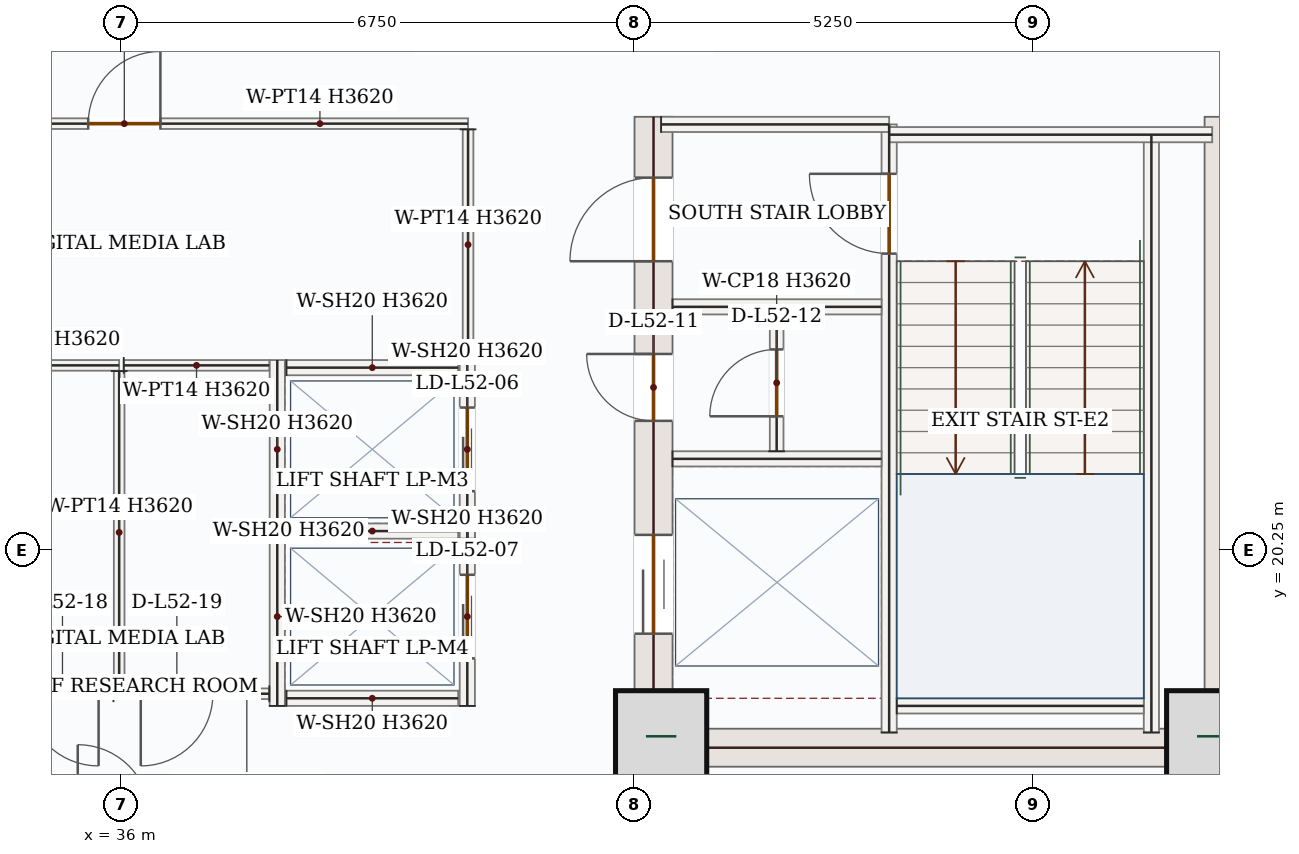
"""IFC4 building model, lengths in metres.
Left out: names, types, materials, properties, quantities, classifications, styles, units other than length and angle.
Written with IfcOpenShell. Run it as: python <this file> out.ifc"""

import sys

from ifc_helpers import new_model, si_unit, direction, frame, frame_2d, origin, origin_2d, place, context, subcontext, project, spatial, rectangle, extrude, source, transform, mapped, element, fill, save


model = new_model("IFC4")
c1 = context("Model", 3, precision=1e-05, world=origin(), true_north=direction((0.0, 1.0)))
c2 = subcontext(c1, "Body", "Model", "MODEL_VIEW")
j1 = project(units=[si_unit("LENGTHUNIT", "METRE"), si_unit("PLANEANGLEUNIT", "RADIAN")], contexts=[c1])
p1 = place(None, origin())
s1 = spatial("IfcSite", under=j1, at=p1, CompositionType="ELEMENT")
p2 = place(p1, origin())
s2 = spatial("IfcBuilding", under=s1, at=p2, CompositionType="ELEMENT")
p3 = place(p2, frame((0.0, 0.0, 221.4)))
s3 = spatial("IfcBuildingStorey", under=s2, at=p3, CompositionType="ELEMENT", Elevation=221.4)
p4 = place(p3, frame((43.0, 17.4, 0.0), z_axis=(0.0, 0.0, 1.0), x_axis=(0.0, 1.0, 0.0)))
e1 = element("IfcWall", 1, at=p4, inside=s3, PredefinedType="SHEAR", context=c2, shape_type="SweptSolid", body=[
    extrude(rectangle(XDim=8.55, YDim=0.5, at=frame_2d((4.275, 0.0))), origin(), (0.0, 0.0, 1.0), 3.62),
])
p5 = place(p4, frame((6.65, 0.0, 0.0)))
e2 = element("IfcOpeningElement", 2, at=p5, cuts=e1, PredefinedType="OPENING", context=c2, shape_type="SweptSolid", body=[
    extrude(rectangle(XDim=1.1, YDim=2.2, at=frame_2d((0.55, 1.1))), frame((0.0, 0.26, 0.0), z_axis=(0.0, -1.0, 0.0), x_axis=(1.0, 0.0, 0.0)), (0.0, 0.0, 1.0), 0.52),
])
p6 = place(p4, frame((1.75, 0.0, 0.0)))
e3 = element("IfcOpeningElement", 3, at=p6, cuts=e1, PredefinedType="OPENING", context=c2, shape_type="SweptSolid", body=[
    extrude(rectangle(XDim=1.3, YDim=2.2, at=frame_2d((0.65, 1.1))), frame((0.0, 0.26, 0.0), z_axis=(0.0, -1.0, 0.0), x_axis=(1.0, 0.0, 0.0)), (0.0, 0.0, 1.0), 0.52),
])
p7 = place(p4, frame((4.55, 0.0, 0.0)))
e4 = element("IfcOpeningElement", 4, at=p7, cuts=e1, PredefinedType="OPENING", context=c2, shape_type="SweptSolid", body=[
    extrude(rectangle(XDim=0.88, YDim=2.1, at=frame_2d((0.44, 1.05))), frame((0.0, 0.26, 0.0), z_axis=(0.0, -1.0, 0.0), x_axis=(1.0, 0.0, 0.0)), (0.0, 0.0, 1.0), 0.52),
])
m1 = source(origin(), c2, "Body", "SweptSolid", [
    extrude(rectangle(XDim=8.55, YDim=0.5, at=frame_2d((4.275, 0.0))), origin(), (0.0, 0.0, 1.0), 3.62),
])
p8 = place(p3, frame((50.5, 17.4, 0.0), z_axis=(0.0, 0.0, 1.0), x_axis=(0.0, 1.0, 0.0)))
e5 = element("IfcWall", 5, at=p8, inside=s3, PredefinedType="SHEAR", context=c2, shape_type="MappedRepresentation", body=[
    mapped(m1, transform((0.0, 0.0, 0.0), x_axis=(1.0, 0.0, 0.0), y_axis=(0.0, 1.0, 0.0), z_axis=(0.0, 0.0, 1.0), scale=1.0)),
])
m2 = source(origin(), c2, "Body", "SweptSolid", [
    extrude(rectangle(XDim=7.0, YDim=0.5, at=frame_2d((3.5, 0.0))), origin(), (0.0, 0.0, 1.0), 3.62),
])
p9 = place(p3, frame((43.25, 17.65, 0.0), z_axis=(0.0, 0.0, 1.0), x_axis=(1.0, 0.0, 0.0)))
e6 = element("IfcWall", 6, at=p9, inside=s3, PredefinedType="SHEAR", context=c2, shape_type="MappedRepresentation", body=[
    mapped(m2, transform((0.0, 0.0, 0.0), x_axis=(1.0, 0.0, 0.0), y_axis=(0.0, 1.0, 0.0), z_axis=(0.0, 0.0, 1.0), scale=1.0)),
])
m3 = source(origin(), c2, "Body", "SweptSolid", [
    extrude(rectangle(XDim=1.2, YDim=1.2, at=origin_2d()), origin(), (0.0, 0.0, 1.0), 3.9),
])
for number, where, z_axis, x_axis in (
    (7, (43.1, 17.8, 0.0), (0.0, 0.0, 1.0), (1.0, 0.0, 0.0)),
    (8, (50.35, 17.8, 0.0), (0.0, 0.0, 1.0), (1.0, 0.0, 0.0)),
):
    element("IfcColumn", number, at=place(p3, frame(where, z_axis=z_axis, x_axis=x_axis)), inside=s3, PredefinedType="COLUMN", context=c2, shape_type="MappedRepresentation", body=[
        mapped(m3, transform((0.0, 0.0, 0.0), x_axis=(1.0, 0.0, 0.0), y_axis=(0.0, 1.0, 0.0), z_axis=(0.0, 0.0, 1.0), scale=1.0)),
    ])
p10 = place(p3, frame((53.06, 18.458, 0.0), z_axis=(0.0, 0.0, 1.0), x_axis=(-0.707106781187, -0.707106781187, 0.0)))
e9 = element("IfcWall", 9, at=p10, inside=s3, PredefinedType="SOLIDWALL", context=c2, shape_type="SweptSolid", body=[
    extrude(rectangle(XDim=5.258, YDim=0.28, at=frame_2d((2.629, 0.0))), origin(), (0.0, 0.0, 1.0), 3.62),
])
p11 = place(p10, frame((1.729, 0.0, 0.85)))
e10 = element("IfcOpeningElement", 10, at=p11, cuts=e9, PredefinedType="OPENING", context=c2, shape_type="SweptSolid", body=[
    extrude(rectangle(XDim=1.8, YDim=1.75, at=frame_2d((0.9, 0.875))), frame((0.0, 0.15, 0.0), z_axis=(0.0, -1.0, 0.0), x_axis=(1.0, 0.0, 0.0)), (0.0, 0.0, 1.0), 0.3),
])
m4 = source(origin(), c2, "Body", "SweptSolid", [
    extrude(rectangle(XDim=7.87, YDim=0.2, at=frame_2d((3.935, 0.0))), origin(), (0.0, 0.0, 1.0), 3.62),
])
p12 = place(p3, frame((49.55, 17.85, 0.0), z_axis=(0.0, 0.0, 1.0), x_axis=(0.0, 1.0, 0.0)))
e11 = element("IfcWall", 11, at=p12, inside=s3, PredefinedType="SOLIDWALL", context=c2, shape_type="MappedRepresentation", body=[
    mapped(m4, transform((0.0, 0.0, 0.0), x_axis=(1.0, 0.0, 0.0), y_axis=(0.0, 1.0, 0.0), z_axis=(0.0, 0.0, 1.0), scale=1.0)),
])
p13 = place(p3, frame((46.1, 17.85, 0.0), z_axis=(0.0, 0.0, 1.0), x_axis=(0.0, 1.0, 0.0)))
e12 = element("IfcWall", 12, at=p13, inside=s3, PredefinedType="SOLIDWALL", context=c2, shape_type="SweptSolid", body=[
    extrude(rectangle(XDim=8.0, YDim=0.2, at=frame_2d((4.0, 0.0))), origin(), (0.0, 0.0, 1.0), 3.62),
])
p14 = place(p13, frame((6.3, 0.0, 0.0)))
e13 = element("IfcOpeningElement", 13, at=p14, cuts=e12, PredefinedType="OPENING", context=c2, shape_type="SweptSolid", body=[
    extrude(rectangle(XDim=1.05, YDim=2.15, at=frame_2d((0.525, 1.075))), frame((0.0, 0.11, 0.0), z_axis=(0.0, -1.0, 0.0), x_axis=(1.0, 0.0, 0.0)), (0.0, 0.0, 1.0), 0.22),
])
m5 = source(origin(), c2, "Body", "SweptSolid", [
    extrude(rectangle(XDim=3.0, YDim=0.2, at=frame_2d((1.5, 0.0))), origin(), (0.0, 0.0, 1.0), 3.62),
])
p15 = place(p3, frame((43.1, 25.85, 0.0), z_axis=(0.0, 0.0, 1.0), x_axis=(1.0, 0.0, 0.0)))
e14 = element("IfcWall", 14, at=p15, inside=s3, PredefinedType="SOLIDWALL", context=c2, shape_type="MappedRepresentation", body=[
    mapped(m5, transform((0.0, 0.0, 0.0), x_axis=(1.0, 0.0, 0.0), y_axis=(0.0, 1.0, 0.0), z_axis=(0.0, 0.0, 1.0), scale=1.0)),
])
m6 = source(origin(), c2, "Body", "SweptSolid", [
    extrude(rectangle(XDim=4.25, YDim=0.2, at=frame_2d((2.125, 0.0))), origin(), (0.0, 0.0, 1.0), 3.62),
])
p16 = place(p3, frame((46.1, 25.715, 0.0), z_axis=(0.0, 0.0, 1.0), x_axis=(1.0, 0.0, 0.0)))
e15 = element("IfcWall", 15, at=p16, inside=s3, PredefinedType="SOLIDWALL", context=c2, shape_type="MappedRepresentation", body=[
    mapped(m6, transform((0.0, 0.0, 0.0), x_axis=(1.0, 0.0, 0.0), y_axis=(0.0, 1.0, 0.0), z_axis=(0.0, 0.0, 1.0), scale=1.0)),
])
m7 = source(origin(), c2, "Body", "SweptSolid", [
    extrude(rectangle(XDim=3.25, YDim=0.2, at=frame_2d((1.625, 0.0))), origin(), (0.0, 0.0, 1.0), 3.62),
])
p17 = place(p3, frame((46.2, 18.2, 0.0), z_axis=(0.0, 0.0, 1.0), x_axis=(1.0, 0.0, 0.0)))
e16 = element("IfcWall", 16, at=p17, inside=s3, PredefinedType="SOLIDWALL", context=c2, shape_type="MappedRepresentation", body=[
    mapped(m7, transform((0.0, 0.0, 0.0), x_axis=(1.0, 0.0, 0.0), y_axis=(0.0, 1.0, 0.0), z_axis=(0.0, 0.0, 1.0), scale=1.0)),
])
m8 = source(origin(), c2, "Body", "SweptSolid", [
    extrude(rectangle(XDim=2.75, YDim=0.2, at=frame_2d((1.375, 0.0))), origin(), (0.0, 0.0, 1.0), 3.62),
])
for number, where, z_axis, x_axis in (
    (17, (43.25, 23.45, 0.0), (0.0, 0.0, 1.0), (1.0, 0.0, 0.0)),
    (18, (43.25, 21.45, 0.0), (0.0, 0.0, 1.0), (1.0, 0.0, 0.0)),
):
    element("IfcWall", number, at=place(p3, frame(where, z_axis=z_axis, x_axis=x_axis)), inside=s3, PredefinedType="SOLIDWALL", context=c2, shape_type="MappedRepresentation", body=[
        mapped(m8, transform((0.0, 0.0, 0.0), x_axis=(1.0, 0.0, 0.0), y_axis=(0.0, 1.0, 0.0), z_axis=(0.0, 0.0, 1.0), scale=1.0)),
    ])
p18 = place(p3, frame((44.62, 21.55, 0.0), z_axis=(0.0, 0.0, 1.0), x_axis=(0.0, 1.0, 0.0)))
e19 = element("IfcWall", 19, at=p18, inside=s3, PredefinedType="PARTITIONING", context=c2, shape_type="SweptSolid", body=[
    extrude(rectangle(XDim=1.8, YDim=0.18, at=frame_2d((0.9, 0.0))), origin(), (0.0, 0.0, 1.0), 3.62),
])
p19 = place(p18, frame((0.46, 0.0, 0.0)))
e20 = element("IfcOpeningElement", 20, at=p19, cuts=e19, PredefinedType="OPENING", context=c2, shape_type="SweptSolid", body=[
    extrude(rectangle(XDim=0.88, YDim=2.1, at=frame_2d((0.44, 1.05))), frame((0.0, 0.1, 0.0), z_axis=(0.0, -1.0, 0.0), x_axis=(1.0, 0.0, 0.0)), (0.0, 0.0, 1.0), 0.2),
])
m9 = source(origin(), c2, "Body", "SweptSolid", [
    extrude(rectangle(XDim=2.35, YDim=0.2, at=frame_2d((1.175, 0.0))), origin(), (0.0, 0.0, 1.0), 3.62),
])
p20 = place(p3, frame((38.05, 20.4, 0.0), z_axis=(0.0, 0.0, 1.0), x_axis=(0.0, 1.0, 0.0)))
e21 = element("IfcWall", 21, at=p20, inside=s3, PredefinedType="SOLIDWALL", context=c2, shape_type="MappedRepresentation", body=[
    mapped(m9, transform((0.0, 0.0, 0.0), x_axis=(1.0, 0.0, 0.0), y_axis=(0.0, 1.0, 0.0), z_axis=(0.0, 0.0, 1.0), scale=1.0)),
])
p21 = place(p3, frame((40.55, 20.4, 0.0), z_axis=(0.0, 0.0, 1.0), x_axis=(0.0, 1.0, 0.0)))
e22 = element("IfcWall", 22, at=p21, inside=s3, PredefinedType="SOLIDWALL", context=c2, shape_type="SweptSolid", body=[
    extrude(rectangle(XDim=2.35, YDim=0.2, at=frame_2d((1.175, 0.0))), origin(), (0.0, 0.0, 1.0), 3.62),
])
p22 = place(p21, frame((0.625, 0.0, 0.0)))
e23 = element("IfcOpeningElement", 23, at=p22, cuts=e22, PredefinedType="OPENING", context=c2, shape_type="SweptSolid", body=[
    extrude(rectangle(XDim=1.1, YDim=2.15, at=frame_2d((0.55, 1.075))), frame((0.0, 0.11, 0.0), z_axis=(0.0, -1.0, 0.0), x_axis=(1.0, 0.0, 0.0)), (0.0, 0.0, 1.0), 0.22),
])
m10 = source(origin(), c2, "Body", "SweptSolid", [
    extrude(rectangle(XDim=2.26, YDim=0.2, at=frame_2d((1.13, 0.0))), origin(), (0.0, 0.0, 1.0), 3.62),
])
for number, where, z_axis, x_axis in (
    (24, (38.17, 20.5, 0.0), (0.0, 0.0, 1.0), (1.0, 0.0, 0.0)),
    (25, (38.17, 22.65, 0.0), (0.0, 0.0, 1.0), (1.0, 0.0, 0.0)),
):
    element("IfcWall", number, at=place(p3, frame(where, z_axis=z_axis, x_axis=x_axis)), inside=s3, PredefinedType="SOLIDWALL", context=c2, shape_type="MappedRepresentation", body=[
        mapped(m10, transform((0.0, 0.0, 0.0), x_axis=(1.0, 0.0, 0.0), y_axis=(0.0, 1.0, 0.0), z_axis=(0.0, 0.0, 1.0), scale=1.0)),
    ])
p23 = place(p3, frame((38.05, 18.2, 0.0), z_axis=(0.0, 0.0, 1.0), x_axis=(0.0, 1.0, 0.0)))
e26 = element("IfcWall", 26, at=p23, inside=s3, PredefinedType="SOLIDWALL", context=c2, shape_type="MappedRepresentation", body=[
    mapped(m9, transform((0.0, 0.0, 0.0), x_axis=(1.0, 0.0, 0.0), y_axis=(0.0, 1.0, 0.0), z_axis=(0.0, 0.0, 1.0), scale=1.0)),
])
p24 = place(p3, frame((40.55, 18.2, 0.0), z_axis=(0.0, 0.0, 1.0), x_axis=(0.0, 1.0, 0.0)))
e27 = element("IfcWall", 27, at=p24, inside=s3, PredefinedType="SOLIDWALL", context=c2, shape_type="SweptSolid", body=[
    extrude(rectangle(XDim=2.35, YDim=0.2, at=frame_2d((1.175, 0.0))), origin(), (0.0, 0.0, 1.0), 3.62),
])
p25 = place(p24, frame((0.625, 0.0, 0.0)))
e28 = element("IfcOpeningElement", 28, at=p25, cuts=e27, PredefinedType="OPENING", context=c2, shape_type="SweptSolid", body=[
    extrude(rectangle(XDim=1.1, YDim=2.15, at=frame_2d((0.55, 1.075))), frame((0.0, 0.11, 0.0), z_axis=(0.0, -1.0, 0.0), x_axis=(1.0, 0.0, 0.0)), (0.0, 0.0, 1.0), 0.22),
])
p26 = place(p3, frame((38.17, 18.3, 0.0), z_axis=(0.0, 0.0, 1.0), x_axis=(1.0, 0.0, 0.0)))
e29 = element("IfcWall", 29, at=p26, inside=s3, PredefinedType="SOLIDWALL", context=c2, shape_type="MappedRepresentation", body=[
    mapped(m10, transform((0.0, 0.0, 0.0), x_axis=(1.0, 0.0, 0.0), y_axis=(0.0, 1.0, 0.0), z_axis=(0.0, 0.0, 1.0), scale=1.0)),
])
m11 = source(origin(), c2, "Body", "SweptSolid", [
    extrude(rectangle(XDim=1.915, YDim=0.14, at=frame_2d((0.958, 0.0))), origin(), (0.0, 0.0, 1.0), 3.62),
])
p27 = place(p3, frame((34.055, 22.68, 0.0), z_axis=(0.0, 0.0, 1.0), x_axis=(1.0, 0.0, 0.0)))
e30 = element("IfcWall", 30, at=p27, inside=s3, PredefinedType="PARTITIONING", context=c2, shape_type="MappedRepresentation", body=[
    mapped(m11, transform((0.0, 0.0, 0.0), x_axis=(1.0, 0.0, 0.0), y_axis=(0.0, 1.0, 0.0), z_axis=(0.0, 0.0, 1.0), scale=1.0)),
])
m12 = source(origin(), c2, "Body", "SweptSolid", [
    extrude(rectangle(XDim=4.245, YDim=0.14, at=frame_2d((2.123, 0.0))), origin(), (0.0, 0.0, 1.0), 3.62),
])
p28 = place(p3, frame((35.97, 22.605, 0.0), z_axis=(0.0, 0.0, 1.0), x_axis=(0.0, -1.0, 0.0)))
e31 = element("IfcWall", 31, at=p28, inside=s3, PredefinedType="PARTITIONING", context=c2, shape_type="MappedRepresentation", body=[
    mapped(m12, transform((0.0, 0.0, 0.0), x_axis=(1.0, 0.0, 0.0), y_axis=(0.0, 1.0, 0.0), z_axis=(0.0, 0.0, 1.0), scale=1.0)),
])
p29 = place(p3, frame((35.895, 18.36, 0.0), z_axis=(0.0, 0.0, 1.0), x_axis=(-1.0, 0.0, 0.0)))
e32 = element("IfcWall", 32, at=p29, inside=s3, PredefinedType="PARTITIONING", context=c2, shape_type="SweptSolid", body=[
    extrude(rectangle(XDim=1.84, YDim=0.14, at=frame_2d((0.92, 0.0))), origin(), (0.0, 0.0, 1.0), 3.62),
])
p30 = place(p29, frame((0.196, 0.0, 0.0)))
e33 = element("IfcOpeningElement", 33, at=p30, cuts=e32, PredefinedType="OPENING", context=c2, shape_type="SweptSolid", body=[
    extrude(rectangle(XDim=0.95, YDim=2.15, at=frame_2d((0.475, 1.075))), frame((0.0, 0.08, 0.0), z_axis=(0.0, -1.0, 0.0), x_axis=(1.0, 0.0, 0.0)), (0.0, 0.0, 1.0), 0.16),
])
p31 = place(p3, frame((36.03, 22.68, 0.0), z_axis=(0.0, 0.0, 1.0), x_axis=(1.0, 0.0, 0.0)))
e34 = element("IfcWall", 34, at=p31, inside=s3, PredefinedType="PARTITIONING", context=c2, shape_type="MappedRepresentation", body=[
    mapped(m11, transform((0.0, 0.0, 0.0), x_axis=(1.0, 0.0, 0.0), y_axis=(0.0, 1.0, 0.0), z_axis=(0.0, 0.0, 1.0), scale=1.0)),
])
p32 = place(p3, frame((37.945, 18.36, 0.0), z_axis=(0.0, 0.0, 1.0), x_axis=(-1.0, 0.0, 0.0)))
e35 = element("IfcWall", 35, at=p32, inside=s3, PredefinedType="PARTITIONING", context=c2, shape_type="SweptSolid", body=[
    extrude(rectangle(XDim=1.9, YDim=0.14, at=frame_2d((0.95, 0.0))), origin(), (0.0, 0.0, 1.0), 3.62),
])
p33 = place(p32, frame((0.741, 0.0, 0.0)))
e36 = element("IfcOpeningElement", 36, at=p33, cuts=e35, PredefinedType="OPENING", context=c2, shape_type="SweptSolid", body=[
    extrude(rectangle(XDim=0.95, YDim=2.15, at=frame_2d((0.475, 1.075))), frame((0.0, 0.08, 0.0), z_axis=(0.0, -1.0, 0.0), x_axis=(1.0, 0.0, 0.0)), (0.0, 0.0, 1.0), 0.16),
])
p34 = place(p3, frame((31.515, 25.86, 0.0), z_axis=(0.0, 0.0, 1.0), x_axis=(1.0, 0.0, 0.0)))
e37 = element("IfcWall", 37, at=p34, inside=s3, PredefinedType="PARTITIONING", context=c2, shape_type="SweptSolid", body=[
    extrude(rectangle(XDim=9.045, YDim=0.14, at=frame_2d((4.522, 0.0))), origin(), (0.0, 0.0, 1.0), 3.62),
])
p35 = place(p34, frame((4.048, 0.0, 0.0)))
e38 = element("IfcOpeningElement", 38, at=p35, cuts=e37, PredefinedType="OPENING", context=c2, shape_type="SweptSolid", body=[
    extrude(rectangle(XDim=0.95, YDim=2.15, at=frame_2d((0.475, 1.075))), frame((0.0, 0.08, 0.0), z_axis=(0.0, -1.0, 0.0), x_axis=(1.0, 0.0, 0.0)), (0.0, 0.0, 1.0), 0.16),
])
m13 = source(origin(), c2, "Body", "SweptSolid", [
    extrude(rectangle(XDim=3.035, YDim=0.14, at=frame_2d((1.518, 0.0))), origin(), (0.0, 0.0, 1.0), 3.62),
])
p36 = place(p3, frame((40.56, 25.785, 0.0), z_axis=(0.0, 0.0, 1.0), x_axis=(0.0, -1.0, 0.0)))
e39 = element("IfcWall", 39, at=p36, inside=s3, PredefinedType="PARTITIONING", context=c2, shape_type="MappedRepresentation", body=[
    mapped(m13, transform((0.0, 0.0, 0.0), x_axis=(1.0, 0.0, 0.0), y_axis=(0.0, 1.0, 0.0), z_axis=(0.0, 0.0, 1.0), scale=1.0)),
])
m14 = source(origin(), c2, "Body", "SweptSolid", [
    extrude(rectangle(XDim=1.05, YDim=2.15, at=frame_2d((0.525, 1.075))), frame((0.0, 0.025, 0.0), z_axis=(0.0, -1.0, 0.0), x_axis=(1.0, 0.0, 0.0)), (0.0, 0.0, 1.0), 0.05),
])
p37 = place(p14, origin())
e40 = element("IfcDoor", 40, at=p37, inside=s3, OperationType="SINGLE_SWING_RIGHT", PredefinedType="DOOR", context=c2, shape_type="MappedRepresentation", body=[
    mapped(m14, transform((0.0, 0.0, 0.0), x_axis=(1.0, 0.0, 0.0), y_axis=(0.0, 1.0, 0.0), z_axis=(0.0, 0.0, 1.0), scale=1.0)),
])
fill(e13, e40)
m15 = source(origin(), c2, "Body", "SweptSolid", [
    extrude(rectangle(XDim=1.1, YDim=2.2, at=frame_2d((0.55, 1.1))), frame((0.0, 0.025, 0.0), z_axis=(0.0, -1.0, 0.0), x_axis=(1.0, 0.0, 0.0)), (0.0, 0.0, 1.0), 0.05),
])
p38 = place(p5, origin())
e41 = element("IfcDoor", 41, at=p38, inside=s3, OperationType="SINGLE_SWING_LEFT", PredefinedType="DOOR", context=c2, shape_type="MappedRepresentation", body=[
    mapped(m15, transform((0.0, 0.0, 0.0), x_axis=(1.0, 0.0, 0.0), y_axis=(0.0, 1.0, 0.0), z_axis=(0.0, 0.0, 1.0), scale=1.0)),
])
fill(e2, e41)
m16 = source(origin(), c2, "Body", "SweptSolid", [
    extrude(rectangle(XDim=1.3, YDim=2.2, at=frame_2d((0.65, 1.1))), frame((0.0, 0.025, 0.0), z_axis=(0.0, -1.0, 0.0), x_axis=(1.0, 0.0, 0.0)), (0.0, 0.0, 1.0), 0.05),
])
p39 = place(p6, origin())
e42 = element("IfcDoor", 42, at=p39, inside=s3, OperationType="DOUBLE_DOOR_SLIDING", PredefinedType="DOOR", context=c2, shape_type="MappedRepresentation", body=[
    mapped(m16, transform((0.0, 0.0, 0.0), x_axis=(1.0, 0.0, 0.0), y_axis=(0.0, 1.0, 0.0), z_axis=(0.0, 0.0, 1.0), scale=1.0)),
])
fill(e3, e42)
m17 = source(origin(), c2, "Body", "SweptSolid", [
    extrude(rectangle(XDim=0.88, YDim=2.1, at=frame_2d((0.44, 1.05))), frame((0.0, 0.025, 0.0), z_axis=(0.0, -1.0, 0.0), x_axis=(1.0, 0.0, 0.0)), (0.0, 0.0, 1.0), 0.05),
])
p40 = place(p7, origin())
e43 = element("IfcDoor", 43, at=p40, inside=s3, OperationType="SINGLE_SWING_RIGHT", PredefinedType="DOOR", context=c2, shape_type="MappedRepresentation", body=[
    mapped(m17, transform((0.0, 0.0, 0.0), x_axis=(1.0, 0.0, 0.0), y_axis=(0.0, 1.0, 0.0), z_axis=(0.0, 0.0, 1.0), scale=1.0)),
])
fill(e4, e43)
p41 = place(p19, origin())
e44 = element("IfcDoor", 44, at=p41, inside=s3, OperationType="SINGLE_SWING_LEFT", PredefinedType="DOOR", context=c2, shape_type="MappedRepresentation", body=[
    mapped(m17, transform((0.0, 0.0, 0.0), x_axis=(1.0, 0.0, 0.0), y_axis=(0.0, 1.0, 0.0), z_axis=(0.0, 0.0, 1.0), scale=1.0)),
])
fill(e20, e44)
m18 = source(origin(), c2, "Body", "SweptSolid", [
    extrude(rectangle(XDim=1.1, YDim=2.15, at=frame_2d((0.55, 1.075))), frame((0.0, 0.025, 0.0), z_axis=(0.0, -1.0, 0.0), x_axis=(1.0, 0.0, 0.0)), (0.0, 0.0, 1.0), 0.05),
])
p42 = place(p22, origin())
e45 = element("IfcDoor", 45, at=p42, inside=s3, OperationType="DOUBLE_DOOR_SLIDING", PredefinedType="DOOR", context=c2, shape_type="MappedRepresentation", body=[
    mapped(m18, transform((0.0, 0.0, 0.0), x_axis=(1.0, 0.0, 0.0), y_axis=(0.0, 1.0, 0.0), z_axis=(0.0, 0.0, 1.0), scale=1.0)),
])
fill(e23, e45)
p43 = place(p25, origin())
e46 = element("IfcDoor", 46, at=p43, inside=s3, OperationType="DOUBLE_DOOR_SLIDING", PredefinedType="DOOR", context=c2, shape_type="MappedRepresentation", body=[
    mapped(m18, transform((0.0, 0.0, 0.0), x_axis=(1.0, 0.0, 0.0), y_axis=(0.0, 1.0, 0.0), z_axis=(0.0, 0.0, 1.0), scale=1.0)),
])
fill(e28, e46)
m19 = source(origin(), c2, "Body", "SweptSolid", [
    extrude(rectangle(XDim=0.95, YDim=2.15, at=frame_2d((0.475, 1.075))), frame((0.0, 0.025, 0.0), z_axis=(0.0, -1.0, 0.0), x_axis=(1.0, 0.0, 0.0)), (0.0, 0.0, 1.0), 0.05),
])
p44 = place(p35, origin())
e47 = element("IfcDoor", 47, at=p44, inside=s3, OperationType="SINGLE_SWING_RIGHT", PredefinedType="DOOR", context=c2, shape_type="MappedRepresentation", body=[
    mapped(m19, transform((0.0, 0.0, 0.0), x_axis=(1.0, 0.0, 0.0), y_axis=(0.0, 1.0, 0.0), z_axis=(0.0, 0.0, 1.0), scale=1.0)),
])
fill(e38, e47)
p45 = place(p30, origin())
e48 = element("IfcDoor", 48, at=p45, inside=s3, OperationType="SINGLE_SWING_LEFT", PredefinedType="DOOR", context=c2, shape_type="MappedRepresentation", body=[
    mapped(m19, transform((0.0, 0.0, 0.0), x_axis=(1.0, 0.0, 0.0), y_axis=(0.0, 1.0, 0.0), z_axis=(0.0, 0.0, 1.0), scale=1.0)),
])
fill(e33, e48)
p46 = place(p33, origin())
e49 = element("IfcDoor", 49, at=p46, inside=s3, OperationType="SINGLE_SWING_RIGHT", PredefinedType="DOOR", context=c2, shape_type="MappedRepresentation", body=[
    mapped(m19, transform((0.0, 0.0, 0.0), x_axis=(1.0, 0.0, 0.0), y_axis=(0.0, 1.0, 0.0), z_axis=(0.0, 0.0, 1.0), scale=1.0)),
])
fill(e36, e49)
save(model, sys.argv[1])
